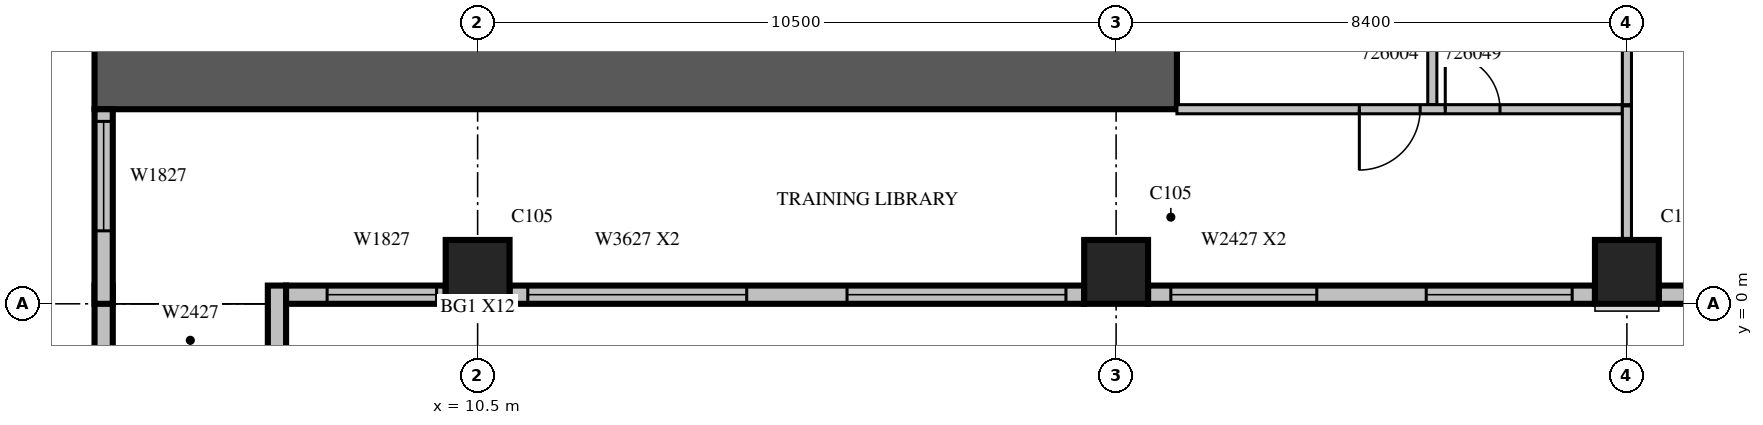
"""IFC4 building model, lengths in metres.
Left out: names, types, materials, properties, quantities, classifications, styles, units other than length and angle.
Written with IfcOpenShell. Run it as: python <this file> out.ifc"""

import sys

from ifc_helpers import new_model, si_unit, direction, frame, frame_2d, origin, origin_2d, place, context, subcontext, project, spatial, rectangle, extrude, source, transform, mapped, element, fill, save


model = new_model("IFC4")
c1 = context("Model", 3, precision=1e-05, world=origin(), true_north=direction((0.0, 1.0)))
c2 = subcontext(c1, "Body", "Model", "MODEL_VIEW")
j1 = project(units=[si_unit("LENGTHUNIT", "METRE"), si_unit("PLANEANGLEUNIT", "RADIAN")], contexts=[c1])
p1 = place(None, origin())
s1 = spatial("IfcSite", under=j1, at=p1, CompositionType="ELEMENT")
p2 = place(p1, origin())
s2 = spatial("IfcBuilding", under=s1, at=p2, CompositionType="ELEMENT")
p3 = place(p2, frame((0.0, 0.0, 120.3)))
s3 = spatial("IfcBuildingStorey", under=s2, at=p3, CompositionType="ELEMENT", Elevation=120.3)
m1 = source(origin(), c2, "Body", "SweptSolid", [
    extrude(rectangle(XDim=1.05, YDim=1.05, at=origin_2d()), origin(), (0.0, 0.0, 1.0), 4.2),
])
for number, where, z_axis, x_axis in (
    (1, (10.5, 0.525, 0.0), (0.0, 0.0, 1.0), (1.0, 0.0, 0.0)),
    (2, (21.0, 0.525, 0.0), (0.0, 0.0, 1.0), (1.0, 0.0, 0.0)),
    (3, (29.4, 0.525, 0.0), (0.0, 0.0, 1.0), (1.0, 0.0, 0.0)),
):
    element("IfcColumn", number, at=place(p3, frame(where, z_axis=z_axis, x_axis=x_axis)), inside=s3, PredefinedType="COLUMN", context=c2, shape_type="MappedRepresentation", body=[
        mapped(m1, transform((0.0, 0.0, 0.0), scale=1.0)),
    ])
m2 = source(origin(), c2, "Body", "SweptSolid", [
    extrude(rectangle(XDim=17.8, YDim=1.0, at=frame_2d((8.9, 0.0))), origin(), (0.0, 0.0, 1.0), 4.2),
])
p4 = place(p3, frame((4.2, 3.7, 0.0), z_axis=(0.0, 0.0, 1.0), x_axis=(1.0, 0.0, 0.0)))
e4 = element("IfcWall", 4, at=p4, inside=s3, PredefinedType="SHEAR", context=c2, shape_type="MappedRepresentation", body=[
    mapped(m2, transform((0.0, 0.0, 0.0), scale=1.0)),
])
m3 = source(origin(), c2, "Body", "SweptSolid", [
    extrude(rectangle(XDim=1.2, YDim=0.3, at=frame_2d((0.6, 0.0))), origin(), (0.0, 0.0, 1.0), 3.8),
])
for number, where, z_axis, x_axis in (
    (5, (4.35, 0.3, 0.0), (0.0, 0.0, 1.0), (0.0, -1.0, 0.0)),
    (6, (7.2, 0.3, 0.0), (0.0, 0.0, 1.0), (0.0, -1.0, 0.0)),
):
    element("IfcWall", number, at=place(p3, frame(where, z_axis=z_axis, x_axis=x_axis)), inside=s3, PredefinedType="STANDARD", context=c2, shape_type="MappedRepresentation", body=[
        mapped(m3, transform((0.0, 0.0, 0.0), scale=1.0)),
    ])
m4 = source(origin(), c2, "Body", "SweptSolid", [
    extrude(rectangle(XDim=2.625, YDim=0.3, at=frame_2d((1.312, 0.0))), origin(), (0.0, 0.0, 1.0), 3.8),
])
p5 = place(p3, frame((7.35, 0.15, 0.0), z_axis=(0.0, 0.0, 1.0), x_axis=(1.0, 0.0, 0.0)))
e7 = element("IfcWall", 7, at=p5, inside=s3, PredefinedType="STANDARD", context=c2, shape_type="MappedRepresentation", body=[
    mapped(m4, transform((0.0, 0.0, 0.0), scale=1.0)),
])
m5 = source(origin(), c2, "Body", "SweptSolid", [
    extrude(rectangle(XDim=1.8, YDim=2.7, at=frame_2d((0.9, 1.35))), frame((0.0, 0.16, 0.0), z_axis=(0.0, -1.0, 0.0), x_axis=(1.0, 0.0, 0.0)), (0.0, 0.0, 1.0), 0.32),
])
p6 = place(p5, frame((0.675, 0.0, 0.6)))
e8 = element("IfcOpeningElement", 8, at=p6, cuts=e7, PredefinedType="OPENING", context=c2, shape_type="MappedRepresentation", body=[
    mapped(m5, transform((0.0, 0.0, 0.0), scale=1.0)),
])
m6 = source(origin(), c2, "Body", "SweptSolid", [
    extrude(rectangle(XDim=9.45, YDim=0.3, at=frame_2d((4.725, 0.0))), origin(), (0.0, 0.0, 1.0), 3.8),
])
p7 = place(p3, frame((11.025, 0.15, 0.0), z_axis=(0.0, 0.0, 1.0), x_axis=(1.0, 0.0, 0.0)))
e9 = element("IfcWall", 9, at=p7, inside=s3, PredefinedType="STANDARD", context=c2, shape_type="MappedRepresentation", body=[
    mapped(m6, transform((0.0, 0.0, 0.0), scale=1.0)),
])
m7 = source(origin(), c2, "Body", "SweptSolid", [
    extrude(rectangle(XDim=3.6, YDim=2.7, at=frame_2d((1.8, 1.35))), frame((0.0, 0.16, 0.0), z_axis=(0.0, -1.0, 0.0), x_axis=(1.0, 0.0, 0.0)), (0.0, 0.0, 1.0), 0.32),
])
p8 = place(p7, frame((0.3, 0.0, 0.6)))
e10 = element("IfcOpeningElement", 10, at=p8, cuts=e9, PredefinedType="OPENING", context=c2, shape_type="MappedRepresentation", body=[
    mapped(m7, transform((0.0, 0.0, 0.0), scale=1.0)),
])
p9 = place(p7, frame((5.55, 0.0, 0.6)))
e11 = element("IfcOpeningElement", 11, at=p9, cuts=e9, PredefinedType="OPENING", context=c2, shape_type="MappedRepresentation", body=[
    mapped(m7, transform((0.0, 0.0, 0.0), scale=1.0)),
])
m8 = source(origin(), c2, "Body", "SweptSolid", [
    extrude(rectangle(XDim=7.35, YDim=0.3, at=frame_2d((3.675, 0.0))), origin(), (0.0, 0.0, 1.0), 3.8),
])
p10 = place(p3, frame((21.525, 0.15, 0.0), z_axis=(0.0, 0.0, 1.0), x_axis=(1.0, 0.0, 0.0)))
e12 = element("IfcWall", 12, at=p10, inside=s3, PredefinedType="STANDARD", context=c2, shape_type="MappedRepresentation", body=[
    mapped(m8, transform((0.0, 0.0, 0.0), scale=1.0)),
])
m9 = source(origin(), c2, "Body", "SweptSolid", [
    extrude(rectangle(XDim=2.4, YDim=2.7, at=frame_2d((1.2, 1.35))), frame((0.0, 0.16, 0.0), z_axis=(0.0, -1.0, 0.0), x_axis=(1.0, 0.0, 0.0)), (0.0, 0.0, 1.0), 0.32),
])
p11 = place(p10, frame((0.375, 0.0, 0.6)))
e13 = element("IfcOpeningElement", 13, at=p11, cuts=e12, PredefinedType="OPENING", context=c2, shape_type="MappedRepresentation", body=[
    mapped(m9, transform((0.0, 0.0, 0.0), scale=1.0)),
])
p12 = place(p10, frame((4.575, 0.0, 0.6)))
e14 = element("IfcOpeningElement", 14, at=p12, cuts=e12, PredefinedType="OPENING", context=c2, shape_type="MappedRepresentation", body=[
    mapped(m9, transform((0.0, 0.0, 0.0), scale=1.0)),
])
p13 = place(p3, frame((29.925, 0.15, 0.0), z_axis=(0.0, 0.0, 1.0), x_axis=(1.0, 0.0, 0.0)))
e15 = element("IfcWall", 15, at=p13, inside=s3, PredefinedType="STANDARD", context=c2, shape_type="MappedRepresentation", body=[
    mapped(m8, transform((0.0, 0.0, 0.0), scale=1.0)),
])
m10 = source(origin(), c2, "Body", "SweptSolid", [
    extrude(rectangle(XDim=3.2, YDim=0.3, at=frame_2d((1.6, 0.0))), origin(), (0.0, 0.0, 1.0), 3.8),
])
p14 = place(p3, frame((4.35, 3.2, 0.0), z_axis=(0.0, 0.0, 1.0), x_axis=(0.0, -1.0, 0.0)))
e16 = element("IfcWall", 16, at=p14, inside=s3, PredefinedType="STANDARD", context=c2, shape_type="MappedRepresentation", body=[
    mapped(m10, transform((0.0, 0.0, 0.0), scale=1.0)),
])
p15 = place(p14, frame((0.2, 0.0, 0.6)))
e17 = element("IfcOpeningElement", 17, at=p15, cuts=e16, PredefinedType="OPENING", context=c2, shape_type="MappedRepresentation", body=[
    mapped(m5, transform((0.0, 0.0, 0.0), scale=1.0)),
])
m11 = source(origin(), c2, "Body", "SweptSolid", [
    extrude(rectangle(XDim=11.725, YDim=0.15, at=frame_2d((5.862, 0.0))), origin(), (0.0, 0.0, 1.0), 3.8),
])
p16 = place(p3, frame((26.2, 15.0, 0.0), z_axis=(0.0, 0.0, 1.0), x_axis=(0.0, -1.0, 0.0)))
e18 = element("IfcWall", 18, at=p16, inside=s3, PredefinedType="PARTITIONING", context=c2, shape_type="MappedRepresentation", body=[
    mapped(m11, transform((0.0, 0.0, 0.0), scale=1.0)),
])
m12 = source(origin(), c2, "Body", "SweptSolid", [
    extrude(rectangle(XDim=0.9, YDim=2.1, at=frame_2d((0.45, 1.05))), frame((0.0, 0.085, 0.0), z_axis=(0.0, -1.0, 0.0), x_axis=(1.0, 0.0, 0.0)), (0.0, 0.0, 1.0), 0.17),
])
p17 = place(p16, frame((8.262, 0.0, 0.0)))
e19 = element("IfcOpeningElement", 19, at=p17, cuts=e18, PredefinedType="OPENING", context=c2, shape_type="MappedRepresentation", body=[
    mapped(m12, transform((0.0, 0.0, 0.0), scale=1.0)),
])
p18 = place(p16, frame((1.525, 0.0, 0.0)))
e20 = element("IfcOpeningElement", 20, at=p18, cuts=e18, PredefinedType="OPENING", context=c2, shape_type="MappedRepresentation", body=[
    mapped(m12, transform((0.0, 0.0, 0.0), scale=1.0)),
])
m13 = source(origin(), c2, "Body", "SweptSolid", [
    extrude(rectangle(XDim=6.701, YDim=0.15, at=frame_2d((3.35, 0.0))), origin(), (0.0, 0.0, 1.0), 3.8),
])
p19 = place(p3, frame((29.4, 3.275, 0.0), z_axis=(0.0, 0.0, 1.0), x_axis=(0.0, 1.0, 0.0)))
e21 = element("IfcWall", 21, at=p19, inside=s3, PredefinedType="PARTITIONING", context=c2, shape_type="MappedRepresentation", body=[
    mapped(m13, transform((0.0, 0.0, 0.0), scale=1.0)),
])
m14 = source(origin(), c2, "Body", "SweptSolid", [
    extrude(rectangle(XDim=7.325, YDim=0.15, at=frame_2d((3.663, 0.0))), origin(), (0.0, 0.0, 1.0), 3.8),
])
p20 = place(p3, frame((22.0, 3.2, 0.0), z_axis=(0.0, 0.0, 1.0), x_axis=(1.0, 0.0, 0.0)))
e22 = element("IfcWall", 22, at=p20, inside=s3, PredefinedType="PARTITIONING", context=c2, shape_type="MappedRepresentation", body=[
    mapped(m14, transform((0.0, 0.0, 0.0), scale=1.0)),
])
m15 = source(origin(), c2, "Body", "SweptSolid", [
    extrude(rectangle(XDim=1.0, YDim=2.1, at=frame_2d((0.5, 1.05))), frame((0.0, 0.085, 0.0), z_axis=(0.0, -1.0, 0.0), x_axis=(1.0, 0.0, 0.0)), (0.0, 0.0, 1.0), 0.17),
])
p21 = place(p20, frame((3.0, 0.0, 0.0)))
e23 = element("IfcOpeningElement", 23, at=p21, cuts=e22, PredefinedType="OPENING", context=c2, shape_type="MappedRepresentation", body=[
    mapped(m15, transform((0.0, 0.0, 0.0), scale=1.0)),
])
p22 = place(p20, frame((4.413, 0.0, 0.0)))
e24 = element("IfcOpeningElement", 24, at=p22, cuts=e22, PredefinedType="OPENING", context=c2, shape_type="MappedRepresentation", body=[
    mapped(m12, transform((0.0, 0.0, 0.0), scale=1.0)),
])
m16 = source(origin(), c2, "Body", "SweptSolid", [
    extrude(rectangle(XDim=2.206, YDim=0.15, at=frame_2d((1.103, 0.0))), origin(), (0.0, 0.0, 1.0), 3.8),
])
p23 = place(p3, frame((29.4, 1.049, 0.0), z_axis=(0.0, 0.0, 1.0), x_axis=(0.0, 1.0, 0.0)))
e25 = element("IfcWall", 25, at=p23, inside=s3, PredefinedType="PARTITIONING", context=c2, shape_type="MappedRepresentation", body=[
    mapped(m16, transform((0.0, 0.0, 0.0), scale=1.0)),
])
m17 = source(origin(), c2, "Body", "SweptSolid", [
    extrude(rectangle(XDim=1.8, YDim=2.7, at=frame_2d((0.9, 1.35))), frame((0.0, 0.03, 0.0), z_axis=(0.0, -1.0, 0.0), x_axis=(1.0, 0.0, 0.0)), (0.0, 0.0, 1.0), 0.06),
])
p24 = place(p6, origin())
e26 = element("IfcWindow", 26, at=p24, inside=s3, PartitioningType="SINGLE_PANEL", PredefinedType="WINDOW", context=c2, shape_type="MappedRepresentation", body=[
    mapped(m17, transform((0.0, 0.0, 0.0), scale=1.0)),
])
fill(e8, e26)
m18 = source(origin(), c2, "Body", "SweptSolid", [
    extrude(rectangle(XDim=3.6, YDim=2.7, at=frame_2d((1.8, 1.35))), frame((0.0, 0.03, 0.0), z_axis=(0.0, -1.0, 0.0), x_axis=(1.0, 0.0, 0.0)), (0.0, 0.0, 1.0), 0.06),
])
p25 = place(p8, origin())
e27 = element("IfcWindow", 27, at=p25, inside=s3, PartitioningType="SINGLE_PANEL", PredefinedType="WINDOW", context=c2, shape_type="MappedRepresentation", body=[
    mapped(m18, transform((0.0, 0.0, 0.0), scale=1.0)),
])
fill(e10, e27)
p26 = place(p9, origin())
e28 = element("IfcWindow", 28, at=p26, inside=s3, PartitioningType="SINGLE_PANEL", PredefinedType="WINDOW", context=c2, shape_type="MappedRepresentation", body=[
    mapped(m18, transform((0.0, 0.0, 0.0), scale=1.0)),
])
fill(e11, e28)
m19 = source(origin(), c2, "Body", "SweptSolid", [
    extrude(rectangle(XDim=2.4, YDim=2.7, at=frame_2d((1.2, 1.35))), frame((0.0, 0.03, 0.0), z_axis=(0.0, -1.0, 0.0), x_axis=(1.0, 0.0, 0.0)), (0.0, 0.0, 1.0), 0.06),
])
p27 = place(p11, origin())
e29 = element("IfcWindow", 29, at=p27, inside=s3, PartitioningType="SINGLE_PANEL", PredefinedType="WINDOW", context=c2, shape_type="MappedRepresentation", body=[
    mapped(m19, transform((0.0, 0.0, 0.0), scale=1.0)),
])
fill(e13, e29)
p28 = place(p12, origin())
e30 = element("IfcWindow", 30, at=p28, inside=s3, PartitioningType="SINGLE_PANEL", PredefinedType="WINDOW", context=c2, shape_type="MappedRepresentation", body=[
    mapped(m19, transform((0.0, 0.0, 0.0), scale=1.0)),
])
fill(e14, e30)
p29 = place(p15, origin())
e31 = element("IfcWindow", 31, at=p29, inside=s3, PartitioningType="SINGLE_PANEL", PredefinedType="WINDOW", context=c2, shape_type="MappedRepresentation", body=[
    mapped(m17, transform((0.0, 0.0, 0.0), scale=1.0)),
])
fill(e17, e31)
m20 = source(origin(), c2, "Body", "SweptSolid", [
    extrude(rectangle(XDim=1.0, YDim=2.1, at=frame_2d((0.5, 1.05))), frame((0.0, 0.025, 0.0), z_axis=(0.0, -1.0, 0.0), x_axis=(1.0, 0.0, 0.0)), (0.0, 0.0, 1.0), 0.05),
])
p30 = place(p21, origin())
e32 = element("IfcDoor", 32, at=p30, inside=s3, OperationType="SINGLE_SWING_RIGHT", PredefinedType="DOOR", context=c2, shape_type="MappedRepresentation", body=[
    mapped(m20, transform((0.0, 0.0, 0.0), scale=1.0)),
])
fill(e23, e32)
m21 = source(origin(), c2, "Body", "SweptSolid", [
    extrude(rectangle(XDim=0.9, YDim=2.1, at=frame_2d((0.45, 1.05))), frame((0.0, 0.025, 0.0), z_axis=(0.0, -1.0, 0.0), x_axis=(1.0, 0.0, 0.0)), (0.0, 0.0, 1.0), 0.05),
])
p31 = place(p22, origin())
e33 = element("IfcDoor", 33, at=p31, inside=s3, OperationType="SINGLE_SWING_LEFT", PredefinedType="DOOR", context=c2, shape_type="MappedRepresentation", body=[
    mapped(m21, transform((0.0, 0.0, 0.0), scale=1.0)),
])
fill(e24, e33)
save(model, sys.argv[1])
